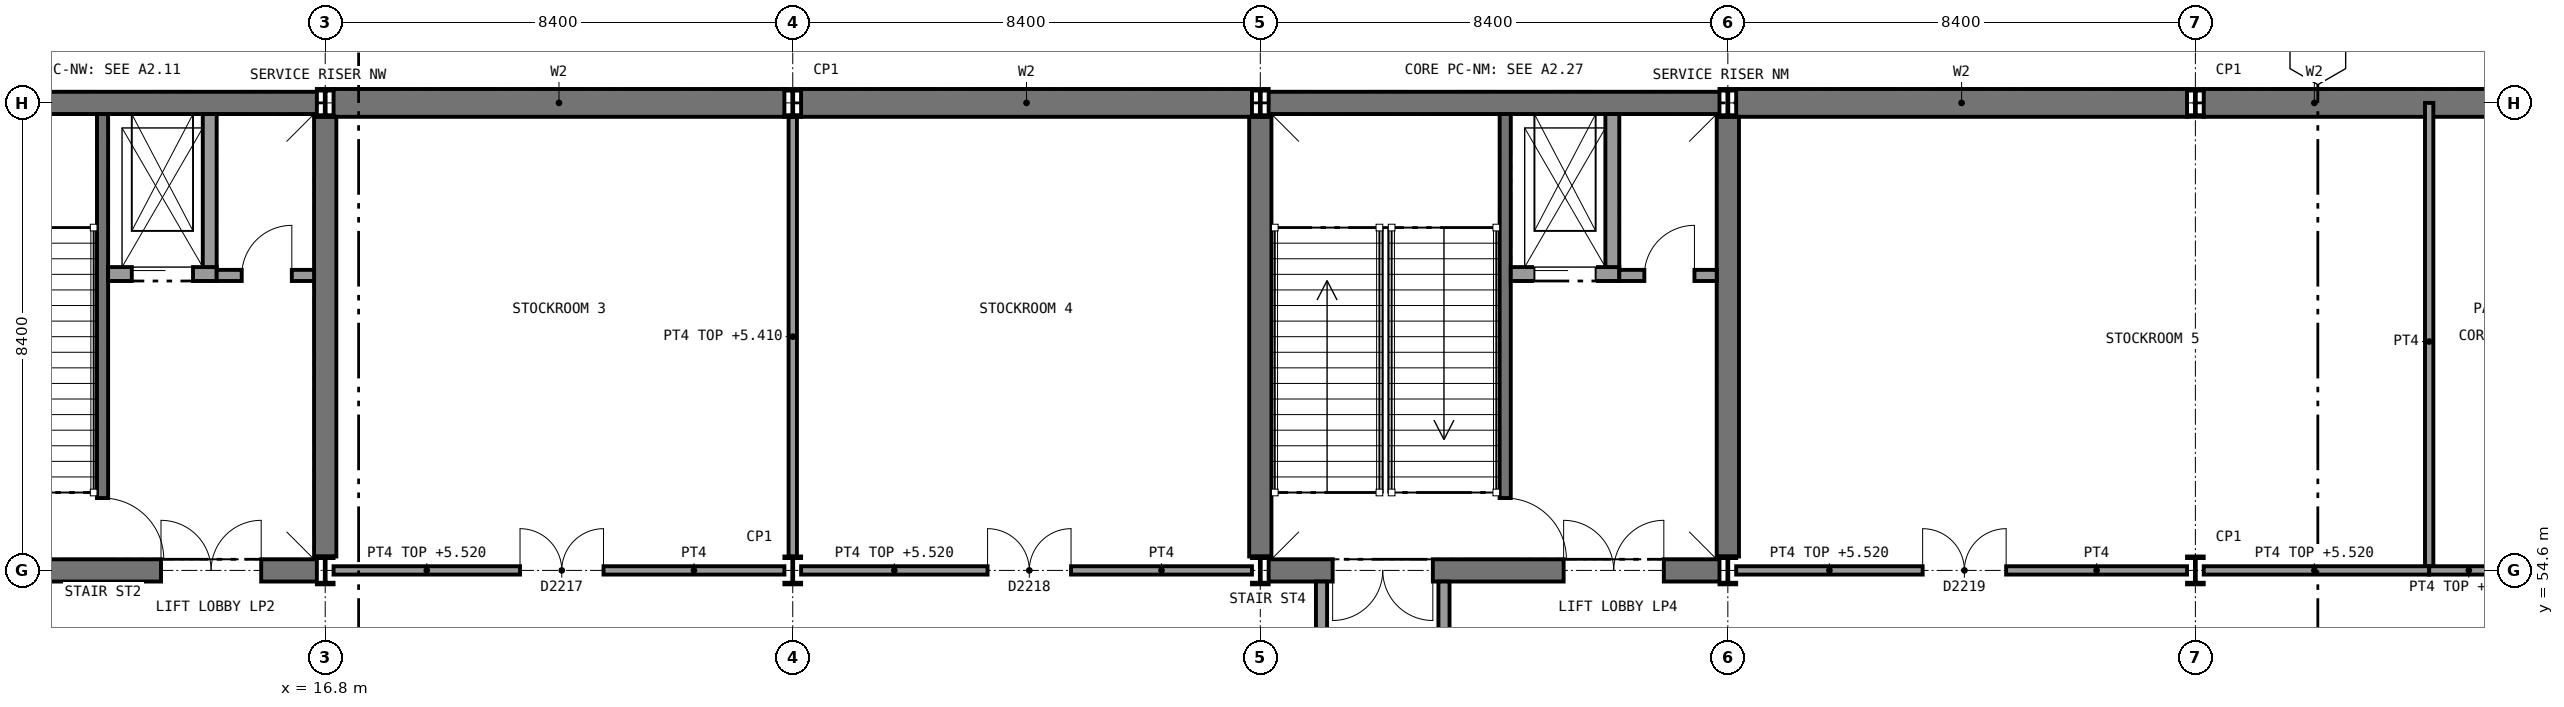
"""IFC4 building model, lengths in metres.
Left out: names, types, materials, properties, quantities, classifications, styles, units other than length and angle.
Written with IfcOpenShell. Run it as: python <this file> out.ifc"""

import sys

from ifc_helpers import new_model, si_unit, direction, frame, frame_2d, origin, origin_2d, place, context, subcontext, project, spatial, rectangle, i_section, extrude, element, fill, save


model = new_model("IFC4")
c1 = context("Model", 3, precision=1e-05, world=origin(), true_north=direction((0.0, 1.0)))
c2 = subcontext(c1, "Body", "Model", "MODEL_VIEW")
j1 = project(units=[si_unit("LENGTHUNIT", "METRE"), si_unit("PLANEANGLEUNIT", "RADIAN")], contexts=[c1])
p1 = place(None, origin())
s1 = spatial("IfcSite", under=j1, at=p1, CompositionType="ELEMENT")
p2 = place(p1, origin())
s2 = spatial("IfcBuilding", under=s1, at=p2, CompositionType="ELEMENT")
p3 = place(p2, origin())
s3 = spatial("IfcBuildingStorey", under=s2, at=p3, CompositionType="ELEMENT", Elevation=0.0)
p4 = place(p3, frame((16.95, 63.0, 0.0), z_axis=(0.0, 0.0, 1.0), x_axis=(1.0, 0.0, 0.0)))
e1 = element("IfcWall", 1, at=p4, inside=s3, PredefinedType="SHEAR", context=c2, shape_type="SweptSolid", body=[
    extrude(rectangle(XDim=8.1, YDim=0.5, at=frame_2d((4.05, 0.0))), origin(), (0.0, 0.0, 1.0), 5.85),
])
p5 = place(p3, frame((25.35, 63.0, 0.0), z_axis=(0.0, 0.0, 1.0), x_axis=(1.0, 0.0, 0.0)))
e2 = element("IfcWall", 2, at=p5, inside=s3, PredefinedType="SHEAR", context=c2, shape_type="SweptSolid", body=[
    extrude(rectangle(XDim=8.1, YDim=0.5, at=frame_2d((4.05, 0.0))), origin(), (0.0, 0.0, 1.0), 5.85),
])
p6 = place(p3, frame((42.15, 63.0, 0.0), z_axis=(0.0, 0.0, 1.0), x_axis=(1.0, 0.0, 0.0)))
e3 = element("IfcWall", 3, at=p6, inside=s3, PredefinedType="SHEAR", context=c2, shape_type="SweptSolid", body=[
    extrude(rectangle(XDim=8.1, YDim=0.5, at=frame_2d((4.05, 0.0))), origin(), (0.0, 0.0, 1.0), 5.85),
])
p7 = place(p3, frame((50.55, 63.0, 0.0), z_axis=(0.0, 0.0, 1.0), x_axis=(1.0, 0.0, 0.0)))
e4 = element("IfcWall", 4, at=p7, inside=s3, PredefinedType="SHEAR", context=c2, shape_type="SweptSolid", body=[
    extrude(rectangle(XDim=8.1, YDim=0.5, at=frame_2d((4.05, 0.0))), origin(), (0.0, 0.0, 1.0), 5.85),
])
p8 = place(p3, frame((8.55, 63.0, 0.0), z_axis=(0.0, 0.0, 1.0), x_axis=(1.0, 0.0, 0.0)))
e5 = element("IfcWall", 5, at=p8, inside=s3, PredefinedType="SHEAR", context=c2, shape_type="SweptSolid", body=[
    extrude(rectangle(XDim=8.1, YDim=0.4, at=frame_2d((4.05, 0.0))), origin(), (0.0, 0.0, 1.0), 5.85),
])
p9 = place(p3, frame((8.55, 54.6, 0.0), z_axis=(0.0, 0.0, 1.0), x_axis=(1.0, 0.0, 0.0)))
e6 = element("IfcWall", 6, at=p9, inside=s3, PredefinedType="SHEAR", context=c2, shape_type="SweptSolid", body=[
    extrude(rectangle(XDim=8.1, YDim=0.4, at=frame_2d((4.05, 0.0))), origin(), (0.0, 0.0, 1.0), 5.85),
])
p10 = place(p9, frame((1.15, 0.0, 0.0)))
e7 = element("IfcOpeningElement", 7, at=p10, cuts=e6, PredefinedType="OPENING", context=c2, shape_type="SweptSolid", body=[
    extrude(rectangle(XDim=1.8, YDim=2.1, at=frame_2d((0.9, 1.05))), frame((0.0, 0.21, 0.0), z_axis=(0.0, -1.0, 0.0), x_axis=(1.0, 0.0, 0.0)), (0.0, 0.0, 1.0), 0.42),
])
p11 = place(p9, frame((5.3, 0.0, 0.0)))
e8 = element("IfcOpeningElement", 8, at=p11, cuts=e6, PredefinedType="OPENING", context=c2, shape_type="SweptSolid", body=[
    extrude(rectangle(XDim=1.8, YDim=2.1, at=frame_2d((0.9, 1.05))), frame((0.0, 0.21, 0.0), z_axis=(0.0, -1.0, 0.0), x_axis=(1.0, 0.0, 0.0)), (0.0, 0.0, 1.0), 0.42),
])
p12 = place(p3, frame((16.8, 54.85, 0.0), z_axis=(0.0, 0.0, 1.0), x_axis=(0.0, 1.0, 0.0)))
e9 = element("IfcWall", 9, at=p12, inside=s3, PredefinedType="SHEAR", context=c2, shape_type="SweptSolid", body=[
    extrude(rectangle(XDim=7.9, YDim=0.4, at=frame_2d((3.95, 0.0))), origin(), (0.0, 0.0, 1.0), 5.85),
])
p13 = place(p3, frame((33.75, 63.0, 0.0), z_axis=(0.0, 0.0, 1.0), x_axis=(1.0, 0.0, 0.0)))
e10 = element("IfcWall", 10, at=p13, inside=s3, PredefinedType="SHEAR", context=c2, shape_type="SweptSolid", body=[
    extrude(rectangle(XDim=8.1, YDim=0.4, at=frame_2d((4.05, 0.0))), origin(), (0.0, 0.0, 1.0), 5.85),
])
p14 = place(p3, frame((33.75, 54.6, 0.0), z_axis=(0.0, 0.0, 1.0), x_axis=(1.0, 0.0, 0.0)))
e11 = element("IfcWall", 11, at=p14, inside=s3, PredefinedType="SHEAR", context=c2, shape_type="SweptSolid", body=[
    extrude(rectangle(XDim=8.1, YDim=0.4, at=frame_2d((4.05, 0.0))), origin(), (0.0, 0.0, 1.0), 5.85),
])
p15 = place(p14, frame((5.3, 0.0, 0.0)))
e12 = element("IfcOpeningElement", 12, at=p15, cuts=e11, PredefinedType="OPENING", context=c2, shape_type="SweptSolid", body=[
    extrude(rectangle(XDim=1.8, YDim=2.1, at=frame_2d((0.9, 1.05))), frame((0.0, 0.21, 0.0), z_axis=(0.0, -1.0, 0.0), x_axis=(1.0, 0.0, 0.0)), (0.0, 0.0, 1.0), 0.42),
])
p16 = place(p14, frame((1.15, 0.0, 0.0)))
e13 = element("IfcOpeningElement", 13, at=p16, cuts=e11, PredefinedType="OPENING", context=c2, shape_type="SweptSolid", body=[
    extrude(rectangle(XDim=1.8, YDim=2.1, at=frame_2d((0.9, 1.05))), frame((0.0, 0.21, 0.0), z_axis=(0.0, -1.0, 0.0), x_axis=(1.0, 0.0, 0.0)), (0.0, 0.0, 1.0), 0.42),
])
for number, where, z_axis, x_axis in (
    (14, (33.6, 54.85, 0.0), (0.0, 0.0, 1.0), (0.0, 1.0, 0.0)),
    (15, (42.0, 54.85, 0.0), (0.0, 0.0, 1.0), (0.0, 1.0, 0.0)),
):
    element("IfcWall", number, at=place(p3, frame(where, z_axis=z_axis, x_axis=x_axis)), inside=s3, PredefinedType="SHEAR", context=c2, shape_type="SweptSolid", body=[
        extrude(rectangle(XDim=7.9, YDim=0.4, at=frame_2d((3.95, 0.0))), origin(), (0.0, 0.0, 1.0), 5.85),
    ])
for number, where, z_axis, x_axis in (
    (16, (16.8, 54.6, 0.0), (0.0, 0.0, 1.0), (1.0, 0.0, 0.0)),
    (17, (16.8, 63.0, 0.0), (0.0, 0.0, 1.0), (1.0, 0.0, 0.0)),
    (18, (25.2, 54.6, 0.0), (0.0, 0.0, 1.0), (1.0, 0.0, 0.0)),
    (19, (25.2, 63.0, 0.0), (0.0, 0.0, 1.0), (1.0, 0.0, 0.0)),
    (20, (33.6, 54.6, 0.0), (0.0, 0.0, 1.0), (1.0, 0.0, 0.0)),
    (21, (33.6, 63.0, 0.0), (0.0, 0.0, 1.0), (1.0, 0.0, 0.0)),
    (22, (42.0, 54.6, 0.0), (0.0, 0.0, 1.0), (1.0, 0.0, 0.0)),
    (23, (42.0, 63.0, 0.0), (0.0, 0.0, 1.0), (1.0, 0.0, 0.0)),
    (24, (50.4, 54.6, 0.0), (0.0, 0.0, 1.0), (1.0, 0.0, 0.0)),
    (25, (50.4, 63.0, 0.0), (0.0, 0.0, 1.0), (1.0, 0.0, 0.0)),
):
    element("IfcColumn", number, at=place(p3, frame(where, z_axis=z_axis, x_axis=x_axis)), inside=s3, PredefinedType="COLUMN", context=c2, shape_type="SweptSolid", body=[
        extrude(i_section(OverallWidth=0.3, OverallDepth=0.5, WebThickness=0.014, FlangeThickness=0.028, FilletRadius=0.027, at=origin_2d()), origin(), (0.0, 0.0, 1.0), 6.0),
    ])
p17 = place(p3, frame((25.2, 54.85, 0.0), z_axis=(0.0, 0.0, 1.0), x_axis=(0.0, 1.0, 0.0)))
e26 = element("IfcWall", 26, at=p17, inside=s3, PredefinedType="SOLIDWALL", context=c2, shape_type="SweptSolid", body=[
    extrude(rectangle(XDim=7.9, YDim=0.15, at=frame_2d((3.95, 0.0))), origin(), (0.0, 0.0, 1.0), 5.41),
])
p18 = place(p3, frame((16.95, 54.6, 0.0), z_axis=(0.0, 0.0, 1.0), x_axis=(1.0, 0.0, 0.0)))
e27 = element("IfcWall", 27, at=p18, inside=s3, PredefinedType="SOLIDWALL", context=c2, shape_type="SweptSolid", body=[
    extrude(rectangle(XDim=8.1, YDim=0.15, at=frame_2d((4.05, 0.0))), origin(), (0.0, 0.0, 1.0), 5.52),
])
p19 = place(p18, frame((3.35, 0.0, 0.0)))
e28 = element("IfcOpeningElement", 28, at=p19, cuts=e27, PredefinedType="OPENING", context=c2, shape_type="SweptSolid", body=[
    extrude(rectangle(XDim=1.5, YDim=2.1, at=frame_2d((0.75, 1.05))), frame((0.0, 0.085, 0.0), z_axis=(0.0, -1.0, 0.0), x_axis=(1.0, 0.0, 0.0)), (0.0, 0.0, 1.0), 0.17),
])
p20 = place(p3, frame((25.35, 54.6, 0.0), z_axis=(0.0, 0.0, 1.0), x_axis=(1.0, 0.0, 0.0)))
e29 = element("IfcWall", 29, at=p20, inside=s3, PredefinedType="SOLIDWALL", context=c2, shape_type="SweptSolid", body=[
    extrude(rectangle(XDim=8.1, YDim=0.15, at=frame_2d((4.05, 0.0))), origin(), (0.0, 0.0, 1.0), 5.52),
])
p21 = place(p20, frame((3.35, 0.0, 0.0)))
e30 = element("IfcOpeningElement", 30, at=p21, cuts=e29, PredefinedType="OPENING", context=c2, shape_type="SweptSolid", body=[
    extrude(rectangle(XDim=1.5, YDim=2.1, at=frame_2d((0.75, 1.05))), frame((0.0, 0.085, 0.0), z_axis=(0.0, -1.0, 0.0), x_axis=(1.0, 0.0, 0.0)), (0.0, 0.0, 1.0), 0.17),
])
p22 = place(p3, frame((54.6, 54.6, 0.0), z_axis=(0.0, 0.0, 1.0), x_axis=(0.0, 1.0, 0.0)))
e31 = element("IfcWall", 31, at=p22, inside=s3, PredefinedType="SOLIDWALL", context=c2, shape_type="SweptSolid", body=[
    extrude(rectangle(XDim=8.4, YDim=0.15, at=frame_2d((4.2, 0.0))), origin(), (0.0, 0.0, 1.0), 5.85),
])
p23 = place(p3, frame((42.15, 54.6, 0.0), z_axis=(0.0, 0.0, 1.0), x_axis=(1.0, 0.0, 0.0)))
e32 = element("IfcWall", 32, at=p23, inside=s3, PredefinedType="SOLIDWALL", context=c2, shape_type="SweptSolid", body=[
    extrude(rectangle(XDim=8.1, YDim=0.15, at=frame_2d((4.05, 0.0))), origin(), (0.0, 0.0, 1.0), 5.52),
])
p24 = place(p23, frame((3.35, 0.0, 0.0)))
e33 = element("IfcOpeningElement", 33, at=p24, cuts=e32, PredefinedType="OPENING", context=c2, shape_type="SweptSolid", body=[
    extrude(rectangle(XDim=1.5, YDim=2.1, at=frame_2d((0.75, 1.05))), frame((0.0, 0.085, 0.0), z_axis=(0.0, -1.0, 0.0), x_axis=(1.0, 0.0, 0.0)), (0.0, 0.0, 1.0), 0.17),
])
p25 = place(p3, frame((50.55, 54.6, 0.0), z_axis=(0.0, 0.0, 1.0), x_axis=(1.0, 0.0, 0.0)))
e34 = element("IfcWall", 34, at=p25, inside=s3, PredefinedType="SOLIDWALL", context=c2, shape_type="SweptSolid", body=[
    extrude(rectangle(XDim=4.05, YDim=0.15, at=frame_2d((2.025, 0.0))), origin(), (0.0, 0.0, 1.0), 5.52),
])
p26 = place(p3, frame((54.6, 54.6, 0.0), z_axis=(0.0, 0.0, 1.0), x_axis=(1.0, 0.0, 0.0)))
e35 = element("IfcWall", 35, at=p26, inside=s3, PredefinedType="SOLIDWALL", context=c2, shape_type="SweptSolid", body=[
    extrude(rectangle(XDim=4.05, YDim=0.15, at=frame_2d((2.025, 0.0))), origin(), (0.0, 0.0, 1.0), 5.52),
])
p27 = place(p26, frame((1.35, 0.0, 0.0)))
e36 = element("IfcOpeningElement", 36, at=p27, cuts=e35, PredefinedType="OPENING", context=c2, shape_type="SweptSolid", body=[
    extrude(rectangle(XDim=1.5, YDim=2.1, at=frame_2d((0.75, 1.05))), frame((0.0, 0.085, 0.0), z_axis=(0.0, -1.0, 0.0), x_axis=(1.0, 0.0, 0.0)), (0.0, 0.0, 1.0), 0.17),
])
p28 = place(p3, frame((12.8, 62.8, 0.0), z_axis=(0.0, 0.0, 1.0), x_axis=(0.0, -1.0, 0.0)))
e37 = element("IfcWall", 37, at=p28, inside=s3, PredefinedType="SHEAR", context=c2, shape_type="SweptSolid", body=[
    extrude(rectangle(XDim=8.0, YDim=0.2, at=frame_2d((4.0, 0.0))), origin(), (0.0, 0.0, 1.0), 5.85),
])
p29 = place(p28, frame((6.9, 0.0, 0.0)))
e38 = element("IfcOpeningElement", 38, at=p29, cuts=e37, PredefinedType="OPENING", context=c2, shape_type="SweptSolid", body=[
    extrude(rectangle(XDim=1.11, YDim=2.1, at=frame_2d((0.555, 1.05))), frame((0.0, 0.11, 0.0), z_axis=(0.0, -1.0, 0.0), x_axis=(1.0, 0.0, 0.0)), (0.0, 0.0, 1.0), 0.22),
])
p30 = place(p3, frame((12.9, 59.925, 0.0), z_axis=(0.0, 0.0, 1.0), x_axis=(1.0, 0.0, 0.0)))
e39 = element("IfcWall", 39, at=p30, inside=s3, PredefinedType="SOLIDWALL", context=c2, shape_type="SweptSolid", body=[
    extrude(rectangle(XDim=1.95, YDim=0.25, at=frame_2d((0.975, 0.0))), origin(), (0.0, 0.0, 1.0), 6.0),
])
p31 = place(p30, frame((0.425, 0.0, 0.0)))
e40 = element("IfcOpeningElement", 40, at=p31, cuts=e39, PredefinedType="OPENING", context=c2, shape_type="SweptSolid", body=[
    extrude(rectangle(XDim=1.1, YDim=2.1, at=frame_2d((0.55, 1.05))), frame((0.0, 0.135, 0.0), z_axis=(0.0, -1.0, 0.0), x_axis=(1.0, 0.0, 0.0)), (0.0, 0.0, 1.0), 0.27),
])
p32 = place(p3, frame((14.725, 62.8, 0.0), z_axis=(0.0, 0.0, 1.0), x_axis=(0.0, -1.0, 0.0)))
e41 = element("IfcWall", 41, at=p32, inside=s3, PredefinedType="SOLIDWALL", context=c2, shape_type="SweptSolid", body=[
    extrude(rectangle(XDim=2.75, YDim=0.25, at=frame_2d((1.375, 0.0))), origin(), (0.0, 0.0, 1.0), 6.0),
])
p33 = place(p3, frame((14.85, 59.9, 0.0), z_axis=(0.0, 0.0, 1.0), x_axis=(1.0, 0.0, 0.0)))
e42 = element("IfcWall", 42, at=p33, inside=s3, PredefinedType="PARTITIONING", context=c2, shape_type="SweptSolid", body=[
    extrude(rectangle(XDim=1.75, YDim=0.2, at=frame_2d((0.875, 0.0))), origin(), (0.0, 0.0, 1.0), 5.85),
])
p34 = place(p33, frame((0.45, 0.0, 0.0)))
e43 = element("IfcOpeningElement", 43, at=p34, cuts=e42, PredefinedType="OPENING", context=c2, shape_type="SweptSolid", body=[
    extrude(rectangle(XDim=0.9, YDim=2.1, at=frame_2d((0.45, 1.05))), frame((0.0, 0.11, 0.0), z_axis=(0.0, -1.0, 0.0), x_axis=(1.0, 0.0, 0.0)), (0.0, 0.0, 1.0), 0.22),
])
p35 = place(p3, frame((38.0, 62.8, 0.0), z_axis=(0.0, 0.0, 1.0), x_axis=(0.0, -1.0, 0.0)))
e44 = element("IfcWall", 44, at=p35, inside=s3, PredefinedType="SHEAR", context=c2, shape_type="SweptSolid", body=[
    extrude(rectangle(XDim=8.0, YDim=0.2, at=frame_2d((4.0, 0.0))), origin(), (0.0, 0.0, 1.0), 5.85),
])
p36 = place(p35, frame((6.9, 0.0, 0.0)))
e45 = element("IfcOpeningElement", 45, at=p36, cuts=e44, PredefinedType="OPENING", context=c2, shape_type="SweptSolid", body=[
    extrude(rectangle(XDim=1.11, YDim=2.1, at=frame_2d((0.555, 1.05))), frame((0.0, 0.11, 0.0), z_axis=(0.0, -1.0, 0.0), x_axis=(1.0, 0.0, 0.0)), (0.0, 0.0, 1.0), 0.22),
])
p37 = place(p3, frame((38.1, 59.925, 0.0), z_axis=(0.0, 0.0, 1.0), x_axis=(1.0, 0.0, 0.0)))
e46 = element("IfcWall", 46, at=p37, inside=s3, PredefinedType="SOLIDWALL", context=c2, shape_type="SweptSolid", body=[
    extrude(rectangle(XDim=1.95, YDim=0.25, at=frame_2d((0.975, 0.0))), origin(), (0.0, 0.0, 1.0), 6.0),
])
p38 = place(p37, frame((0.425, 0.0, 0.0)))
e47 = element("IfcOpeningElement", 47, at=p38, cuts=e46, PredefinedType="OPENING", context=c2, shape_type="SweptSolid", body=[
    extrude(rectangle(XDim=1.1, YDim=2.1, at=frame_2d((0.55, 1.05))), frame((0.0, 0.135, 0.0), z_axis=(0.0, -1.0, 0.0), x_axis=(1.0, 0.0, 0.0)), (0.0, 0.0, 1.0), 0.27),
])
p39 = place(p3, frame((39.925, 62.8, 0.0), z_axis=(0.0, 0.0, 1.0), x_axis=(0.0, -1.0, 0.0)))
e48 = element("IfcWall", 48, at=p39, inside=s3, PredefinedType="SOLIDWALL", context=c2, shape_type="SweptSolid", body=[
    extrude(rectangle(XDim=2.75, YDim=0.25, at=frame_2d((1.375, 0.0))), origin(), (0.0, 0.0, 1.0), 6.0),
])
p40 = place(p3, frame((40.05, 59.9, 0.0), z_axis=(0.0, 0.0, 1.0), x_axis=(1.0, 0.0, 0.0)))
e49 = element("IfcWall", 49, at=p40, inside=s3, PredefinedType="PARTITIONING", context=c2, shape_type="SweptSolid", body=[
    extrude(rectangle(XDim=1.75, YDim=0.2, at=frame_2d((0.875, 0.0))), origin(), (0.0, 0.0, 1.0), 5.85),
])
p41 = place(p40, frame((0.45, 0.0, 0.0)))
e50 = element("IfcOpeningElement", 50, at=p41, cuts=e49, PredefinedType="OPENING", context=c2, shape_type="SweptSolid", body=[
    extrude(rectangle(XDim=0.9, YDim=2.1, at=frame_2d((0.45, 1.05))), frame((0.0, 0.11, 0.0), z_axis=(0.0, -1.0, 0.0), x_axis=(1.0, 0.0, 0.0)), (0.0, 0.0, 1.0), 0.22),
])
for number, where, z_axis, x_axis in (
    (51, (34.7, 54.4, 0.0), (0.0, 0.0, 1.0), (0.0, -1.0, 0.0)),
    (52, (36.9, 54.4, 0.0), (0.0, 0.0, 1.0), (0.0, -1.0, 0.0)),
):
    element("IfcWall", number, at=place(p3, frame(where, z_axis=z_axis, x_axis=x_axis)), inside=s3, PredefinedType="PARTITIONING", context=c2, shape_type="SweptSolid", body=[
        extrude(rectangle(XDim=16.4, YDim=0.2, at=frame_2d((8.2, 0.0))), origin(), (0.0, 0.0, 1.0), 5.85),
    ])
p42 = place(p19, origin())
e53 = element("IfcDoor", 53, at=p42, inside=s3, OperationType="DOUBLE_DOOR_SINGLE_SWING", PredefinedType="DOOR", context=c2, shape_type="SweptSolid", body=[
    extrude(rectangle(XDim=1.5, YDim=2.1, at=frame_2d((0.75, 1.05))), frame((0.0, 0.025, 0.0), z_axis=(0.0, -1.0, 0.0), x_axis=(1.0, 0.0, 0.0)), (0.0, 0.0, 1.0), 0.05),
])
fill(e28, e53)
p43 = place(p21, origin())
e54 = element("IfcDoor", 54, at=p43, inside=s3, OperationType="DOUBLE_DOOR_SINGLE_SWING", PredefinedType="DOOR", context=c2, shape_type="SweptSolid", body=[
    extrude(rectangle(XDim=1.5, YDim=2.1, at=frame_2d((0.75, 1.05))), frame((0.0, 0.025, 0.0), z_axis=(0.0, -1.0, 0.0), x_axis=(1.0, 0.0, 0.0)), (0.0, 0.0, 1.0), 0.05),
])
fill(e30, e54)
p44 = place(p24, origin())
e55 = element("IfcDoor", 55, at=p44, inside=s3, OperationType="DOUBLE_DOOR_SINGLE_SWING", PredefinedType="DOOR", context=c2, shape_type="SweptSolid", body=[
    extrude(rectangle(XDim=1.5, YDim=2.1, at=frame_2d((0.75, 1.05))), frame((0.0, 0.025, 0.0), z_axis=(0.0, -1.0, 0.0), x_axis=(1.0, 0.0, 0.0)), (0.0, 0.0, 1.0), 0.05),
])
fill(e33, e55)
p45 = place(p29, origin())
e56 = element("IfcDoor", 56, at=p45, inside=s3, OperationType="SINGLE_SWING_RIGHT", PredefinedType="DOOR", context=c2, shape_type="SweptSolid", body=[
    extrude(rectangle(XDim=1.1, YDim=2.1, at=frame_2d((0.55, 1.05))), frame((0.0, 0.025, 0.0), z_axis=(0.0, -1.0, 0.0), x_axis=(1.0, 0.0, 0.0)), (0.0, 0.0, 1.0), 0.05),
])
fill(e38, e56)
p46 = place(p31, frame((1.1, 0.0, 0.0), z_axis=(0.0, 0.0, 1.0), x_axis=(-1.0, 0.0, 0.0)))
e57 = element("IfcDoor", 57, at=p46, inside=s3, OperationType="SLIDING_TO_RIGHT", PredefinedType="DOOR", context=c2, shape_type="SweptSolid", body=[
    extrude(rectangle(XDim=1.1, YDim=2.1, at=frame_2d((0.55, 1.05))), frame((0.0, 0.025, 0.0), z_axis=(0.0, -1.0, 0.0), x_axis=(1.0, 0.0, 0.0)), (0.0, 0.0, 1.0), 0.05),
])
fill(e40, e57)
p47 = place(p34, origin())
e58 = element("IfcDoor", 58, at=p47, inside=s3, OperationType="SINGLE_SWING_RIGHT", PredefinedType="DOOR", context=c2, shape_type="SweptSolid", body=[
    extrude(rectangle(XDim=0.9, YDim=2.1, at=frame_2d((0.45, 1.05))), frame((0.0, 0.025, 0.0), z_axis=(0.0, -1.0, 0.0), x_axis=(1.0, 0.0, 0.0)), (0.0, 0.0, 1.0), 0.05),
])
fill(e43, e58)
p48 = place(p11, origin())
e59 = element("IfcDoor", 59, at=p48, inside=s3, OperationType="DOUBLE_DOOR_SINGLE_SWING", PredefinedType="DOOR", context=c2, shape_type="SweptSolid", body=[
    extrude(rectangle(XDim=1.8, YDim=2.1, at=frame_2d((0.9, 1.05))), frame((0.0, 0.025, 0.0), z_axis=(0.0, -1.0, 0.0), x_axis=(1.0, 0.0, 0.0)), (0.0, 0.0, 1.0), 0.05),
])
fill(e8, e59)
p49 = place(p36, origin())
e60 = element("IfcDoor", 60, at=p49, inside=s3, OperationType="SINGLE_SWING_RIGHT", PredefinedType="DOOR", context=c2, shape_type="SweptSolid", body=[
    extrude(rectangle(XDim=1.1, YDim=2.1, at=frame_2d((0.55, 1.05))), frame((0.0, 0.025, 0.0), z_axis=(0.0, -1.0, 0.0), x_axis=(1.0, 0.0, 0.0)), (0.0, 0.0, 1.0), 0.05),
])
fill(e45, e60)
p50 = place(p38, frame((1.1, 0.0, 0.0), z_axis=(0.0, 0.0, 1.0), x_axis=(-1.0, 0.0, 0.0)))
e61 = element("IfcDoor", 61, at=p50, inside=s3, OperationType="SLIDING_TO_RIGHT", PredefinedType="DOOR", context=c2, shape_type="SweptSolid", body=[
    extrude(rectangle(XDim=1.1, YDim=2.1, at=frame_2d((0.55, 1.05))), frame((0.0, 0.025, 0.0), z_axis=(0.0, -1.0, 0.0), x_axis=(1.0, 0.0, 0.0)), (0.0, 0.0, 1.0), 0.05),
])
fill(e47, e61)
p51 = place(p41, origin())
e62 = element("IfcDoor", 62, at=p51, inside=s3, OperationType="SINGLE_SWING_RIGHT", PredefinedType="DOOR", context=c2, shape_type="SweptSolid", body=[
    extrude(rectangle(XDim=0.9, YDim=2.1, at=frame_2d((0.45, 1.05))), frame((0.0, 0.025, 0.0), z_axis=(0.0, -1.0, 0.0), x_axis=(1.0, 0.0, 0.0)), (0.0, 0.0, 1.0), 0.05),
])
fill(e50, e62)
p52 = place(p15, origin())
e63 = element("IfcDoor", 63, at=p52, inside=s3, OperationType="DOUBLE_DOOR_SINGLE_SWING", PredefinedType="DOOR", context=c2, shape_type="SweptSolid", body=[
    extrude(rectangle(XDim=1.8, YDim=2.1, at=frame_2d((0.9, 1.05))), frame((0.0, 0.025, 0.0), z_axis=(0.0, -1.0, 0.0), x_axis=(1.0, 0.0, 0.0)), (0.0, 0.0, 1.0), 0.05),
])
fill(e12, e63)
p53 = place(p16, frame((1.8, 0.0, 0.0), z_axis=(0.0, 0.0, 1.0), x_axis=(-1.0, 0.0, 0.0)))
e64 = element("IfcDoor", 64, at=p53, inside=s3, OperationType="DOUBLE_DOOR_SINGLE_SWING", PredefinedType="DOOR", context=c2, shape_type="SweptSolid", body=[
    extrude(rectangle(XDim=1.8, YDim=2.1, at=frame_2d((0.9, 1.05))), frame((0.0, 0.025, 0.0), z_axis=(0.0, -1.0, 0.0), x_axis=(1.0, 0.0, 0.0)), (0.0, 0.0, 1.0), 0.05),
])
fill(e13, e64)
save(model, sys.argv[1])
